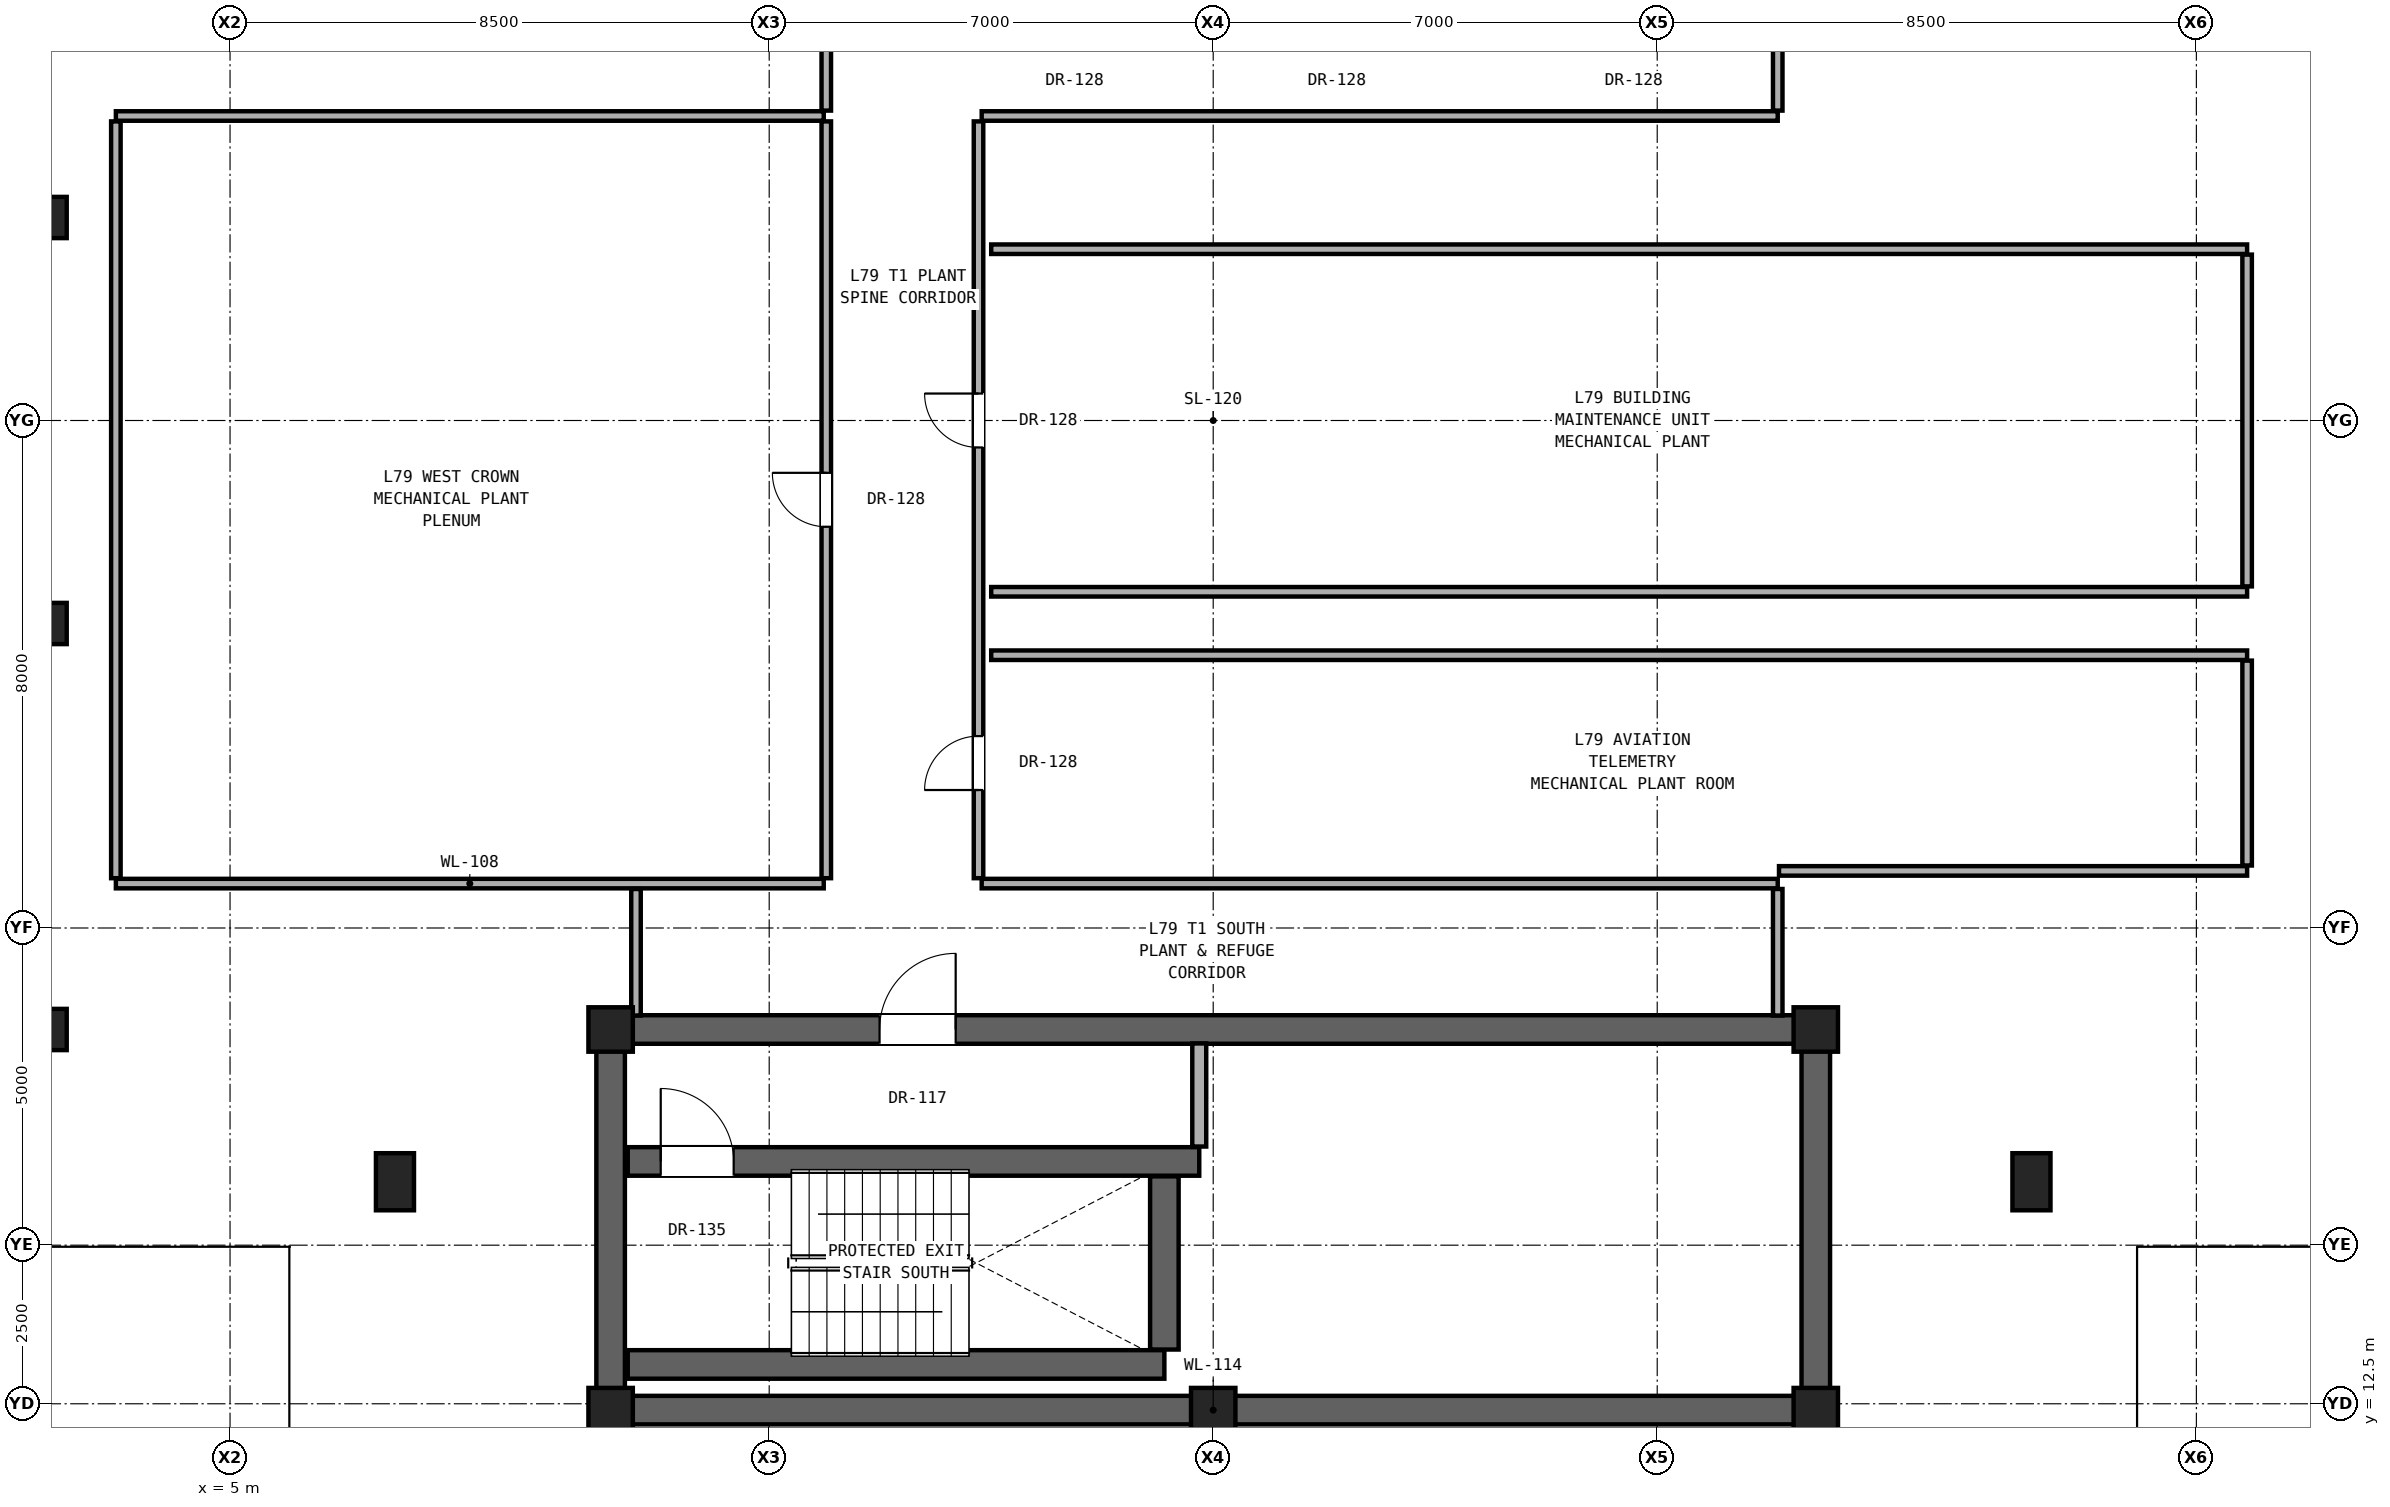
"""IFC4 building model, lengths in metres.
Left out: names, types, materials, properties, quantities, classifications, styles, units other than length and angle.
Written with IfcOpenShell. Run it as: python <this file> out.ifc"""

import sys

from ifc_helpers import new_model, si_unit, direction, frame, frame_2d, origin, origin_2d, place, context, subcontext, project, spatial, rectangle, hollow_rectangle, extrude, element, fill, save


model = new_model("IFC4")
c1 = context("Model", 3, precision=1e-05, world=origin(), true_north=direction((0.0, 1.0)))
c2 = subcontext(c1, "Body", "Model", "MODEL_VIEW")
j1 = project(units=[si_unit("LENGTHUNIT", "METRE"), si_unit("PLANEANGLEUNIT", "RADIAN")], contexts=[c1])
p1 = place(None, origin())
s1 = spatial("IfcSite", under=j1, at=p1, CompositionType="ELEMENT")
p2 = place(p1, origin())
s2 = spatial("IfcBuilding", under=s1, at=p2, CompositionType="ELEMENT")
p3 = place(p2, frame((0.0, 0.0, 273.9)))
s3 = spatial("IfcBuildingStorey", under=s2, at=p3, CompositionType="ELEMENT", Elevation=273.9)
for number, where, z_axis, x_axis in (
    (1, (11.0, 12.4, 0.0), (0.0, 0.0, 1.0), (1.0, 0.0, 0.0)),
    (2, (20.5, 12.4, 0.0), (0.0, 0.0, 1.0), (1.0, 0.0, 0.0)),
    (3, (30.0, 12.4, 0.0), (0.0, 0.0, 1.0), (1.0, 0.0, 0.0)),
    (4, (11.0, 18.4, 0.0), (0.0, 0.0, 1.0), (1.0, 0.0, 0.0)),
    (5, (30.0, 18.4, 0.0), (0.0, 0.0, 1.0), (1.0, 0.0, 0.0)),
):
    element("IfcColumn", number, at=place(p3, frame(where, z_axis=z_axis, x_axis=x_axis)), inside=s3, PredefinedType="COLUMN", context=c2, shape_type="SweptSolid", body=[
        extrude(rectangle(XDim=0.7, YDim=0.7, at=origin_2d()), origin(), (0.0, 0.0, 1.0), 2.6),
    ])
for number, where, z_axis, x_axis in (
    (6, (2.1, 18.4, 0.0), (0.0, 0.0, 1.0), (1.0, 0.0, 0.0)),
    (7, (2.1, 24.8, 0.0), (0.0, 0.0, 1.0), (1.0, 0.0, 0.0)),
    (8, (2.1, 31.2, 0.0), (0.0, 0.0, 1.0), (1.0, 0.0, 0.0)),
):
    element("IfcColumn", number, at=place(p3, frame(where, z_axis=z_axis, x_axis=x_axis)), inside=s3, PredefinedType="COLUMN", context=c2, shape_type="SweptSolid", body=[
        extrude(hollow_rectangle(XDim=0.65, YDim=0.65, WallThickness=0.036, at=origin_2d()), origin(), (0.0, 0.0, 1.0), 2.6),
    ])
for number, where, z_axis, x_axis in (
    (9, (7.6, 16.0, 0.0), (0.0, 0.0, 1.0), (1.0, 0.0, 0.0)),
    (10, (33.4, 16.0, 0.0), (0.0, 0.0, 1.0), (1.0, 0.0, 0.0)),
):
    element("IfcColumn", number, at=place(p3, frame(where, z_axis=z_axis, x_axis=x_axis)), inside=s3, PredefinedType="PILASTER", context=c2, shape_type="SweptSolid", body=[
        extrude(rectangle(XDim=0.6, YDim=0.9, at=origin_2d()), origin(), (0.0, 0.0, 1.0), 2.6),
    ])
p4 = place(p3, frame((11.0, 12.4, 0.0), z_axis=(0.0, 0.0, 1.0), x_axis=(1.0, 0.0, 0.0)))
e11 = element("IfcWall", 11, at=p4, inside=s3, PredefinedType="SHEAR", context=c2, shape_type="SweptSolid", body=[
    extrude(rectangle(XDim=19.0, YDim=0.45, at=frame_2d((9.5, 0.0))), origin(), (0.0, 0.0, 1.0), 2.37),
])
p5 = place(p3, frame((11.0, 12.4, 0.0), z_axis=(0.0, 0.0, 1.0), x_axis=(0.0, 1.0, 0.0)))
e12 = element("IfcWall", 12, at=p5, inside=s3, PredefinedType="SHEAR", context=c2, shape_type="SweptSolid", body=[
    extrude(rectangle(XDim=6.0, YDim=0.45, at=frame_2d((3.0, 0.0))), origin(), (0.0, 0.0, 1.0), 1.79),
])
p6 = place(p3, frame((30.0, 12.4, 0.0), z_axis=(0.0, 0.0, 1.0), x_axis=(0.0, 1.0, 0.0)))
e13 = element("IfcWall", 13, at=p6, inside=s3, PredefinedType="SHEAR", context=c2, shape_type="SweptSolid", body=[
    extrude(rectangle(XDim=6.0, YDim=0.45, at=frame_2d((3.0, 0.0))), origin(), (0.0, 0.0, 1.0), 2.37),
])
p7 = place(p3, frame((11.0, 18.4, 0.0), z_axis=(0.0, 0.0, 1.0), x_axis=(1.0, 0.0, 0.0)))
e14 = element("IfcWall", 14, at=p7, inside=s3, PredefinedType="SHEAR", context=c2, shape_type="SweptSolid", body=[
    extrude(rectangle(XDim=19.0, YDim=0.45, at=frame_2d((9.5, 0.0))), origin(), (0.0, 0.0, 1.0), 2.37),
])
p8 = place(p7, frame((4.24, 0.0, 0.0)))
e15 = element("IfcOpeningElement", 15, at=p8, cuts=e14, PredefinedType="OPENING", context=c2, shape_type="SweptSolid", body=[
    extrude(rectangle(XDim=1.2, YDim=2.25, at=frame_2d((0.6, 1.125))), frame((0.0, 0.235, 0.0), z_axis=(0.0, -1.0, 0.0), x_axis=(1.0, 0.0, 0.0)), (0.0, 0.0, 1.0), 0.47),
])
p9 = place(p3, frame((11.27, 13.12, 0.0), z_axis=(0.0, 0.0, 1.0), x_axis=(1.0, 0.0, 0.0)))
e16 = element("IfcWall", 16, at=p9, inside=s3, PredefinedType="SHEAR", context=c2, shape_type="SweptSolid", body=[
    extrude(rectangle(XDim=8.46, YDim=0.45, at=frame_2d((4.23, 0.0))), origin(), (0.0, 0.0, 1.0), 2.37),
])
p10 = place(p3, frame((11.27, 16.32, 0.0), z_axis=(0.0, 0.0, 1.0), x_axis=(1.0, 0.0, 0.0)))
e17 = element("IfcWall", 17, at=p10, inside=s3, PredefinedType="SHEAR", context=c2, shape_type="SweptSolid", body=[
    extrude(rectangle(XDim=9.01, YDim=0.45, at=frame_2d((4.505, 0.0))), origin(), (0.0, 0.0, 1.0), 2.37),
])
p11 = place(p10, frame((0.52, 0.0, 0.0)))
e18 = element("IfcOpeningElement", 18, at=p11, cuts=e17, PredefinedType="OPENING", context=c2, shape_type="SweptSolid", body=[
    extrude(rectangle(XDim=1.15, YDim=2.2, at=frame_2d((0.575, 1.1))), frame((0.0, 0.235, 0.0), z_axis=(0.0, -1.0, 0.0), x_axis=(1.0, 0.0, 0.0)), (0.0, 0.0, 1.0), 0.47),
])
p12 = place(p3, frame((3.2, 20.7, 0.0), z_axis=(0.0, 0.0, 1.0), x_axis=(1.0, 0.0, 0.0)))
e19 = element("IfcWall", 19, at=p12, inside=s3, PredefinedType="PARTITIONING", context=c2, shape_type="SweptSolid", body=[
    extrude(rectangle(XDim=11.16, YDim=0.15, at=frame_2d((5.58, 0.0))), origin(), (0.0, 0.0, 1.0), 2.032),
])
p13 = place(p3, frame((16.85, 20.7, 0.0), z_axis=(0.0, 0.0, 1.0), x_axis=(1.0, 0.0, 0.0)))
e20 = element("IfcWall", 20, at=p13, inside=s3, PredefinedType="PARTITIONING", context=c2, shape_type="SweptSolid", body=[
    extrude(rectangle(XDim=12.55, YDim=0.15, at=frame_2d((6.275, 0.0))), origin(), (0.0, 0.0, 1.0), 2.032),
])
p14 = place(p3, frame((29.42, 20.9, 0.0), z_axis=(0.0, 0.0, 1.0), x_axis=(1.0, 0.0, 0.0)))
e21 = element("IfcWall", 21, at=p14, inside=s3, PredefinedType="PARTITIONING", context=c2, shape_type="SweptSolid", body=[
    extrude(rectangle(XDim=7.38, YDim=0.15, at=frame_2d((3.69, 0.0))), origin(), (0.0, 0.0, 1.0), 2.032),
])
for number, where, z_axis, x_axis in (
    (22, (17.0, 24.3, 0.0), (0.0, 0.0, 1.0), (1.0, 0.0, 0.0)),
    (23, (17.0, 25.3, 0.0), (0.0, 0.0, 1.0), (1.0, 0.0, 0.0)),
    (24, (17.0, 30.7, 0.0), (0.0, 0.0, 1.0), (1.0, 0.0, 0.0)),
):
    element("IfcWall", number, at=place(p3, frame(where, z_axis=z_axis, x_axis=x_axis)), inside=s3, PredefinedType="PARTITIONING", context=c2, shape_type="SweptSolid", body=[
        extrude(rectangle(XDim=19.8, YDim=0.15, at=frame_2d((9.9, 0.0))), origin(), (0.0, 0.0, 1.0), 2.032),
    ])
p15 = place(p3, frame((3.2, 32.8, 0.0), z_axis=(0.0, 0.0, 1.0), x_axis=(1.0, 0.0, 0.0)))
e25 = element("IfcWall", 25, at=p15, inside=s3, PredefinedType="PARTITIONING", context=c2, shape_type="SweptSolid", body=[
    extrude(rectangle(XDim=11.16, YDim=0.15, at=frame_2d((5.58, 0.0))), origin(), (0.0, 0.0, 1.0), 2.032),
])
p16 = place(p3, frame((16.85, 32.8, 0.0), z_axis=(0.0, 0.0, 1.0), x_axis=(1.0, 0.0, 0.0)))
e26 = element("IfcWall", 26, at=p16, inside=s3, PredefinedType="PARTITIONING", context=c2, shape_type="SweptSolid", body=[
    extrude(rectangle(XDim=12.55, YDim=0.15, at=frame_2d((6.275, 0.0))), origin(), (0.0, 0.0, 1.0), 2.032),
])
p17 = place(p3, frame((3.2, 20.785, 0.0), z_axis=(0.0, 0.0, 1.0), x_axis=(0.0, 1.0, 0.0)))
e27 = element("IfcWall", 27, at=p17, inside=s3, PredefinedType="PARTITIONING", context=c2, shape_type="SweptSolid", body=[
    extrude(rectangle(XDim=11.93, YDim=0.15, at=frame_2d((5.965, 0.0))), origin(), (0.0, 0.0, 1.0), 2.032),
])
p18 = place(p3, frame((11.4, 18.62, 0.0), z_axis=(0.0, 0.0, 1.0), x_axis=(0.0, 1.0, 0.0)))
e28 = element("IfcWall", 28, at=p18, inside=s3, PredefinedType="PARTITIONING", context=c2, shape_type="SweptSolid", body=[
    extrude(rectangle(XDim=1.995, YDim=0.15, at=frame_2d((0.998, 0.0))), origin(), (0.0, 0.0, 1.0), 2.37),
])
p19 = place(p3, frame((14.4, 20.785, 0.0), z_axis=(0.0, 0.0, 1.0), x_axis=(0.0, 1.0, 0.0)))
e29 = element("IfcWall", 29, at=p19, inside=s3, PredefinedType="PARTITIONING", context=c2, shape_type="SweptSolid", body=[
    extrude(rectangle(XDim=11.93, YDim=0.15, at=frame_2d((5.965, 0.0))), origin(), (0.0, 0.0, 1.0), 2.032),
])
p20 = place(p19, frame((5.54, 0.0, 0.0)))
e30 = element("IfcOpeningElement", 30, at=p20, cuts=e29, PredefinedType="OPENING", context=c2, shape_type="SweptSolid", body=[
    extrude(rectangle(XDim=0.85, YDim=2.01, at=frame_2d((0.425, 1.005))), frame((0.0, 0.085, 0.0), z_axis=(0.0, -1.0, 0.0), x_axis=(1.0, 0.0, 0.0)), (0.0, 0.0, 1.0), 0.17),
])
p21 = place(p3, frame((14.4, 32.885, 0.0), z_axis=(0.0, 0.0, 1.0), x_axis=(0.0, 1.0, 0.0)))
e31 = element("IfcWall", 31, at=p21, inside=s3, PredefinedType="PARTITIONING", context=c2, shape_type="SweptSolid", body=[
    extrude(rectangle(XDim=1.48, YDim=0.15, at=frame_2d((0.74, 0.0))), origin(), (0.0, 0.0, 1.0), 2.37),
])
p22 = place(p3, frame((16.8, 20.785, 0.0), z_axis=(0.0, 0.0, 1.0), x_axis=(0.0, 1.0, 0.0)))
e32 = element("IfcWall", 32, at=p22, inside=s3, PredefinedType="PARTITIONING", context=c2, shape_type="SweptSolid", body=[
    extrude(rectangle(XDim=11.93, YDim=0.15, at=frame_2d((5.965, 0.0))), origin(), (0.0, 0.0, 1.0), 2.032),
])
p23 = place(p22, frame((6.79, 0.0, 0.0)))
e33 = element("IfcOpeningElement", 33, at=p23, cuts=e32, PredefinedType="OPENING", context=c2, shape_type="SweptSolid", body=[
    extrude(rectangle(XDim=0.85, YDim=2.01, at=frame_2d((0.425, 1.005))), frame((0.0, 0.085, 0.0), z_axis=(0.0, -1.0, 0.0), x_axis=(1.0, 0.0, 0.0)), (0.0, 0.0, 1.0), 0.17),
])
p24 = place(p22, frame((1.39, 0.0, 0.0)))
e34 = element("IfcOpeningElement", 34, at=p24, cuts=e32, PredefinedType="OPENING", context=c2, shape_type="SweptSolid", body=[
    extrude(rectangle(XDim=0.85, YDim=2.01, at=frame_2d((0.425, 1.005))), frame((0.0, 0.085, 0.0), z_axis=(0.0, -1.0, 0.0), x_axis=(1.0, 0.0, 0.0)), (0.0, 0.0, 1.0), 0.17),
])
p25 = place(p3, frame((19.73, 13.355, 0.0), z_axis=(0.0, 0.0, 1.0), x_axis=(0.0, 1.0, 0.0)))
e35 = element("IfcWall", 35, at=p25, inside=s3, PredefinedType="SHEAR", context=c2, shape_type="SweptSolid", body=[
    extrude(rectangle(XDim=2.73, YDim=0.45, at=frame_2d((1.365, 0.0))), origin(), (0.0, 0.0, 1.0), 2.37),
])
p26 = place(p3, frame((20.28, 16.555, 0.0), z_axis=(0.0, 0.0, 1.0), x_axis=(0.0, 1.0, 0.0)))
e36 = element("IfcWall", 36, at=p26, inside=s3, PredefinedType="SOLIDWALL", context=c2, shape_type="SweptSolid", body=[
    extrude(rectangle(XDim=1.625, YDim=0.22, at=frame_2d((0.812, 0.0))), origin(), (0.0, 0.0, 1.0), 2.37),
])
p27 = place(p3, frame((29.4, 18.62, 0.0), z_axis=(0.0, 0.0, 1.0), x_axis=(0.0, 1.0, 0.0)))
e37 = element("IfcWall", 37, at=p27, inside=s3, PredefinedType="PARTITIONING", context=c2, shape_type="SweptSolid", body=[
    extrude(rectangle(XDim=1.995, YDim=0.15, at=frame_2d((0.998, 0.0))), origin(), (0.0, 0.0, 1.0), 2.37),
])
p28 = place(p3, frame((29.4, 32.885, 0.0), z_axis=(0.0, 0.0, 1.0), x_axis=(0.0, 1.0, 0.0)))
e38 = element("IfcWall", 38, at=p28, inside=s3, PredefinedType="PARTITIONING", context=c2, shape_type="SweptSolid", body=[
    extrude(rectangle(XDim=1.445, YDim=0.15, at=frame_2d((0.723, 0.0))), origin(), (0.0, 0.0, 1.0), 2.37),
])
p29 = place(p3, frame((36.8, 20.985, 0.0), z_axis=(0.0, 0.0, 1.0), x_axis=(0.0, 1.0, 0.0)))
e39 = element("IfcWall", 39, at=p29, inside=s3, PredefinedType="PARTITIONING", context=c2, shape_type="SweptSolid", body=[
    extrude(rectangle(XDim=3.23, YDim=0.15, at=frame_2d((1.615, 0.0))), origin(), (0.0, 0.0, 1.0), 2.37),
])
p30 = place(p3, frame((36.8, 25.385, 0.0), z_axis=(0.0, 0.0, 1.0), x_axis=(0.0, 1.0, 0.0)))
e40 = element("IfcWall", 40, at=p30, inside=s3, PredefinedType="PARTITIONING", context=c2, shape_type="SweptSolid", body=[
    extrude(rectangle(XDim=5.23, YDim=0.15, at=frame_2d((2.615, 0.0))), origin(), (0.0, 0.0, 1.0), 2.37),
])
p31 = place(p8, origin())
e41 = element("IfcDoor", 41, at=p31, inside=s3, OperationType="SINGLE_SWING_RIGHT", PredefinedType="DOOR", context=c2, shape_type="SweptSolid", body=[
    extrude(rectangle(XDim=1.2, YDim=2.25, at=frame_2d((0.6, 1.125))), frame((0.0, 0.025, 0.0), z_axis=(0.0, -1.0, 0.0), x_axis=(1.0, 0.0, 0.0)), (0.0, 0.0, 1.0), 0.05),
])
fill(e15, e41)
p32 = place(p11, origin())
e42 = element("IfcDoor", 42, at=p32, inside=s3, OperationType="SINGLE_SWING_LEFT", PredefinedType="DOOR", context=c2, shape_type="SweptSolid", body=[
    extrude(rectangle(XDim=1.15, YDim=2.2, at=frame_2d((0.575, 1.1))), frame((0.0, 0.025, 0.0), z_axis=(0.0, -1.0, 0.0), x_axis=(1.0, 0.0, 0.0)), (0.0, 0.0, 1.0), 0.05),
])
fill(e18, e42)
p33 = place(p23, origin())
e43 = element("IfcDoor", 43, at=p33, inside=s3, OperationType="SINGLE_SWING_RIGHT", PredefinedType="DOOR", context=c2, shape_type="SweptSolid", body=[
    extrude(rectangle(XDim=0.85, YDim=2.01, at=frame_2d((0.425, 1.005))), frame((0.0, 0.025, 0.0), z_axis=(0.0, -1.0, 0.0), x_axis=(1.0, 0.0, 0.0)), (0.0, 0.0, 1.0), 0.05),
])
fill(e33, e43)
p34 = place(p24, origin())
e44 = element("IfcDoor", 44, at=p34, inside=s3, OperationType="SINGLE_SWING_LEFT", PredefinedType="DOOR", context=c2, shape_type="SweptSolid", body=[
    extrude(rectangle(XDim=0.85, YDim=2.01, at=frame_2d((0.425, 1.005))), frame((0.0, 0.025, 0.0), z_axis=(0.0, -1.0, 0.0), x_axis=(1.0, 0.0, 0.0)), (0.0, 0.0, 1.0), 0.05),
])
fill(e34, e44)
p35 = place(p20, origin())
e45 = element("IfcDoor", 45, at=p35, inside=s3, OperationType="SINGLE_SWING_RIGHT", PredefinedType="DOOR", context=c2, shape_type="SweptSolid", body=[
    extrude(rectangle(XDim=0.85, YDim=2.01, at=frame_2d((0.425, 1.005))), frame((0.0, 0.025, 0.0), z_axis=(0.0, -1.0, 0.0), x_axis=(1.0, 0.0, 0.0)), (0.0, 0.0, 1.0), 0.05),
])
fill(e30, e45)
save(model, sys.argv[1])
